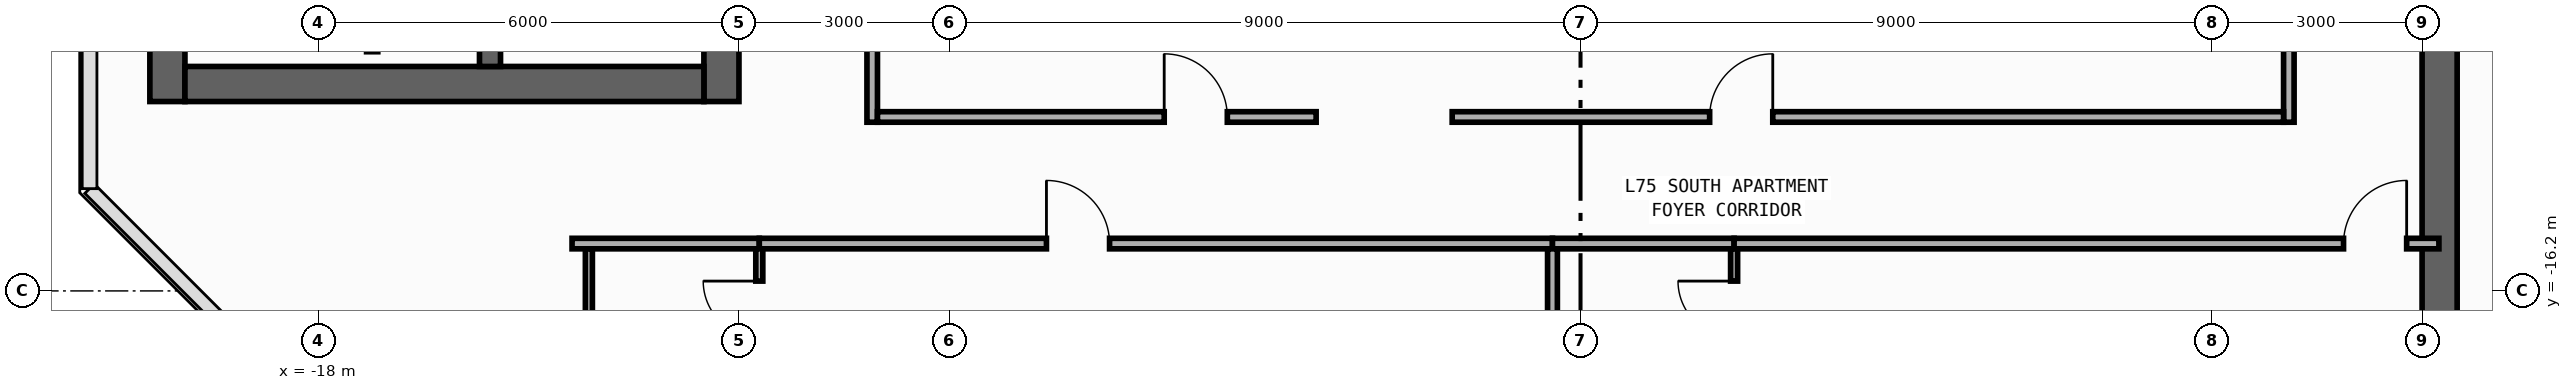
"""IFC4 building model, lengths in metres.
Left out: names, types, materials, properties, quantities, classifications, styles, units other than length and angle.
Written with IfcOpenShell. Run it as: python <this file> out.ifc"""

import sys

from ifc_helpers import new_model, si_unit, direction, frame, frame_2d, origin, place, context, subcontext, project, spatial, rectangle, extrude, element, fill, save


model = new_model("IFC4")
c1 = context("Model", 3, precision=1e-05, world=origin(), true_north=direction((0.0, 1.0)))
c2 = subcontext(c1, "Body", "Model", "MODEL_VIEW")
j1 = project(units=[si_unit("LENGTHUNIT", "METRE"), si_unit("PLANEANGLEUNIT", "RADIAN")], contexts=[c1])
p1 = place(None, origin())
s1 = spatial("IfcSite", under=j1, at=p1, CompositionType="ELEMENT")
p2 = place(p1, origin())
s2 = spatial("IfcBuilding", under=s1, at=p2, CompositionType="ELEMENT")
p3 = place(p2, frame((0.0, 0.0, 311.8)))
s3 = spatial("IfcBuildingStorey", under=s2, at=p3, CompositionType="ELEMENT", Elevation=311.8)
p4 = place(p3, frame((-20.15, -13.5, 0.0), z_axis=(0.0, 0.0, 1.0), x_axis=(0.0, 1.0, 0.0)))
e1 = element("IfcWall", 1, at=p4, inside=s3, PredefinedType="SHEAR", context=c2, shape_type="SweptSolid", body=[
    extrude(rectangle(XDim=27.0, YDim=0.5, at=frame_2d((13.5, 0.0))), origin(), (0.0, 0.0, 1.0), 3.54),
])
p5 = place(p3, frame((-12.25, -13.5, 0.0), z_axis=(0.0, 0.0, 1.0), x_axis=(0.0, 1.0, 0.0)))
e2 = element("IfcWall", 2, at=p5, inside=s3, PredefinedType="SHEAR", context=c2, shape_type="SweptSolid", body=[
    extrude(rectangle(XDim=27.0, YDim=0.5, at=frame_2d((13.5, 0.0))), origin(), (0.0, 0.0, 1.0), 3.54),
])
p6 = place(p5, frame((15.175, 0.0, 0.0)))
e3 = element("IfcOpeningElement", 3, at=p6, cuts=e2, PredefinedType="OPENING", context=c2, shape_type="SweptSolid", body=[
    extrude(rectangle(XDim=0.85, YDim=2.1, at=frame_2d((0.425, 1.05))), frame((0.0, 0.26, 0.0), z_axis=(0.0, -1.0, 0.0), x_axis=(1.0, 0.0, 0.0)), (0.0, 0.0, 1.0), 0.52),
])
p7 = place(p5, frame((21.275, 0.0, 0.0)))
e4 = element("IfcOpeningElement", 4, at=p7, cuts=e2, PredefinedType="OPENING", context=c2, shape_type="SweptSolid", body=[
    extrude(rectangle(XDim=0.85, YDim=2.1, at=frame_2d((0.425, 1.05))), frame((0.0, 0.26, 0.0), z_axis=(0.0, -1.0, 0.0), x_axis=(1.0, 0.0, 0.0)), (0.0, 0.0, 1.0), 0.52),
])
p8 = place(p5, frame((4.275, 0.0, 0.0)))
e5 = element("IfcOpeningElement", 5, at=p8, cuts=e2, PredefinedType="OPENING", context=c2, shape_type="SweptSolid", body=[
    extrude(rectangle(XDim=0.85, YDim=2.1, at=frame_2d((0.425, 1.05))), frame((0.0, 0.26, 0.0), z_axis=(0.0, -1.0, 0.0), x_axis=(1.0, 0.0, 0.0)), (0.0, 0.0, 1.0), 0.52),
])
p9 = place(p5, frame((10.275, 0.0, 0.0)))
e6 = element("IfcOpeningElement", 6, at=p9, cuts=e2, PredefinedType="OPENING", context=c2, shape_type="SweptSolid", body=[
    extrude(rectangle(XDim=0.85, YDim=2.1, at=frame_2d((0.425, 1.05))), frame((0.0, 0.26, 0.0), z_axis=(0.0, -1.0, 0.0), x_axis=(1.0, 0.0, 0.0)), (0.0, 0.0, 1.0), 0.52),
])
p10 = place(p5, frame((12.725, 0.0, 0.0)))
e7 = element("IfcOpeningElement", 7, at=p10, cuts=e2, PredefinedType="OPENING", context=c2, shape_type="SweptSolid", body=[
    extrude(rectangle(XDim=1.15, YDim=2.2, at=frame_2d((0.575, 1.1))), frame((0.0, 0.26, 0.0), z_axis=(0.0, -1.0, 0.0), x_axis=(1.0, 0.0, 0.0)), (0.0, 0.0, 1.0), 0.52),
])
p11 = place(p5, frame((1.625, 0.0, 0.0)))
e8 = element("IfcOpeningElement", 8, at=p11, cuts=e2, PredefinedType="OPENING", context=c2, shape_type="SweptSolid", body=[
    extrude(rectangle(XDim=0.85, YDim=2.1, at=frame_2d((0.425, 1.05))), frame((0.0, 0.26, 0.0), z_axis=(0.0, -1.0, 0.0), x_axis=(1.0, 0.0, 0.0)), (0.0, 0.0, 1.0), 0.52),
])
p12 = place(p3, frame((-19.9, -13.25, 0.0), z_axis=(0.0, 0.0, 1.0), x_axis=(1.0, 0.0, 0.0)))
e9 = element("IfcWall", 9, at=p12, inside=s3, PredefinedType="SHEAR", context=c2, shape_type="SweptSolid", body=[
    extrude(rectangle(XDim=7.4, YDim=0.5, at=frame_2d((3.7, 0.0))), origin(), (0.0, 0.0, 1.0), 3.54),
])
p13 = place(p3, frame((-15.55, -13.0, 0.0), z_axis=(0.0, 0.0, 1.0), x_axis=(0.0, 1.0, 0.0)))
e10 = element("IfcWall", 10, at=p13, inside=s3, PredefinedType="SHEAR", context=c2, shape_type="SweptSolid", body=[
    extrude(rectangle(XDim=26.0, YDim=0.3, at=frame_2d((13.0, 0.0))), origin(), (0.0, 0.0, 1.0), 3.54),
])
p14 = place(p13, frame((12.225, 0.0, 0.0)))
e11 = element("IfcOpeningElement", 11, at=p14, cuts=e10, PredefinedType="OPENING", context=c2, shape_type="SweptSolid", body=[
    extrude(rectangle(XDim=1.15, YDim=2.2, at=frame_2d((0.575, 1.1))), frame((0.0, 0.16, 0.0), z_axis=(0.0, -1.0, 0.0), x_axis=(1.0, 0.0, 0.0)), (0.0, 0.0, 1.0), 0.32),
])
p15 = place(p13, frame((1.125, 0.0, 0.0)))
e12 = element("IfcOpeningElement", 12, at=p15, cuts=e10, PredefinedType="OPENING", context=c2, shape_type="SweptSolid", body=[
    extrude(rectangle(XDim=0.85, YDim=2.1, at=frame_2d((0.425, 1.05))), frame((0.0, 0.16, 0.0), z_axis=(0.0, -1.0, 0.0), x_axis=(1.0, 0.0, 0.0)), (0.0, 0.0, 1.0), 0.32),
])
p16 = place(p3, frame((12.25, -19.8, 0.0), z_axis=(0.0, 0.0, 1.0), x_axis=(0.0, 1.0, 0.0)))
e13 = element("IfcWall", 13, at=p16, inside=s3, PredefinedType="SHEAR", context=c2, shape_type="SweptSolid", body=[
    extrude(rectangle(XDim=27.0, YDim=0.5, at=frame_2d((13.5, 0.0))), origin(), (0.0, 0.0, 1.0), 3.54),
])
p17 = place(p16, frame((23.05, 0.0, 0.0)))
e14 = element("IfcOpeningElement", 14, at=p17, cuts=e13, PredefinedType="OPENING", context=c2, shape_type="SweptSolid", body=[
    extrude(rectangle(XDim=1.1, YDim=2.2, at=frame_2d((0.55, 1.1))), frame((0.0, 0.26, 0.0), z_axis=(0.0, -1.0, 0.0), x_axis=(1.0, 0.0, 0.0)), (0.0, 0.0, 1.0), 0.52),
])
p18 = place(p16, frame((19.85, 0.0, 0.0)))
e15 = element("IfcOpeningElement", 15, at=p18, cuts=e13, PredefinedType="OPENING", context=c2, shape_type="SweptSolid", body=[
    extrude(rectangle(XDim=1.1, YDim=2.2, at=frame_2d((0.55, 1.1))), frame((0.0, 0.26, 0.0), z_axis=(0.0, -1.0, 0.0), x_axis=(1.0, 0.0, 0.0)), (0.0, 0.0, 1.0), 0.52),
])
p19 = place(p16, frame((16.65, 0.0, 0.0)))
e16 = element("IfcOpeningElement", 16, at=p19, cuts=e13, PredefinedType="OPENING", context=c2, shape_type="SweptSolid", body=[
    extrude(rectangle(XDim=1.1, YDim=2.2, at=frame_2d((0.55, 1.1))), frame((0.0, 0.26, 0.0), z_axis=(0.0, -1.0, 0.0), x_axis=(1.0, 0.0, 0.0)), (0.0, 0.0, 1.0), 0.52),
])
p20 = place(p16, frame((10.175, 0.0, 0.0)))
e17 = element("IfcOpeningElement", 17, at=p20, cuts=e13, PredefinedType="OPENING", context=c2, shape_type="SweptSolid", body=[
    extrude(rectangle(XDim=0.85, YDim=2.1, at=frame_2d((0.425, 1.05))), frame((0.0, 0.26, 0.0), z_axis=(0.0, -1.0, 0.0), x_axis=(1.0, 0.0, 0.0)), (0.0, 0.0, 1.0), 0.52),
])
p21 = place(p16, frame((12.725, 0.0, 0.0)))
e18 = element("IfcOpeningElement", 18, at=p21, cuts=e13, PredefinedType="OPENING", context=c2, shape_type="SweptSolid", body=[
    extrude(rectangle(XDim=1.15, YDim=2.2, at=frame_2d((0.575, 1.1))), frame((0.0, 0.26, 0.0), z_axis=(0.0, -1.0, 0.0), x_axis=(1.0, 0.0, 0.0)), (0.0, 0.0, 1.0), 0.52),
])
p22 = place(p16, frame((25.125, 0.0, 0.0)))
e19 = element("IfcOpeningElement", 19, at=p22, cuts=e13, PredefinedType="OPENING", context=c2, shape_type="SweptSolid", body=[
    extrude(rectangle(XDim=0.85, YDim=2.1, at=frame_2d((0.425, 1.05))), frame((0.0, 0.26, 0.0), z_axis=(0.0, -1.0, 0.0), x_axis=(1.0, 0.0, 0.0)), (0.0, 0.0, 1.0), 0.52),
])
p23 = place(p3, frame((-10.1, -13.795, 0.0), z_axis=(0.0, 0.0, 1.0), x_axis=(0.0, 1.0, 0.0)))
e20 = element("IfcWall", 20, at=p23, inside=s3, PredefinedType="PARTITIONING", context=c2, shape_type="SweptSolid", body=[
    extrude(rectangle(XDim=10.205, YDim=0.15, at=frame_2d((5.103, 0.0))), origin(), (0.0, 0.0, 1.0), 3.54),
])
p24 = place(p23, frame((8.027, 0.0, 0.0)))
e21 = element("IfcOpeningElement", 21, at=p24, cuts=e20, PredefinedType="OPENING", context=c2, shape_type="SweptSolid", body=[
    extrude(rectangle(XDim=0.9, YDim=2.15, at=frame_2d((0.45, 1.075))), frame((0.0, 0.085, 0.0), z_axis=(0.0, -1.0, 0.0), x_axis=(1.0, 0.0, 0.0)), (0.0, 0.0, 1.0), 0.17),
])
p25 = place(p3, frame((10.1, -13.795, 0.0), z_axis=(0.0, 0.0, 1.0), x_axis=(0.0, 1.0, 0.0)))
e22 = element("IfcWall", 22, at=p25, inside=s3, PredefinedType="PARTITIONING", context=c2, shape_type="SweptSolid", body=[
    extrude(rectangle(XDim=7.575, YDim=0.15, at=frame_2d((3.788, 0.0))), origin(), (0.0, 0.0, 1.0), 3.54),
])
p26 = place(p25, frame((6.215, 0.0, 0.0)))
e23 = element("IfcOpeningElement", 23, at=p26, cuts=e22, PredefinedType="OPENING", context=c2, shape_type="SweptSolid", body=[
    extrude(rectangle(XDim=0.9, YDim=2.15, at=frame_2d((0.45, 1.075))), frame((0.0, 0.085, 0.0), z_axis=(0.0, -1.0, 0.0), x_axis=(1.0, 0.0, 0.0)), (0.0, 0.0, 1.0), 0.17),
])
p27 = place(p3, frame((-14.38, -15.525, 0.0), z_axis=(0.0, 0.0, 1.0), x_axis=(1.0, 0.0, 0.0)))
e24 = element("IfcWall", 24, at=p27, inside=s3, PredefinedType="PARTITIONING", context=c2, shape_type="SweptSolid", body=[
    extrude(rectangle(XDim=2.67, YDim=0.15, at=frame_2d((1.335, 0.0))), origin(), (0.0, 0.0, 1.0), 3.54),
])
p28 = place(p3, frame((-11.71, -15.525, 0.0), z_axis=(0.0, 0.0, 1.0), x_axis=(1.0, 0.0, 0.0)))
e25 = element("IfcWall", 25, at=p28, inside=s3, PredefinedType="PARTITIONING", context=c2, shape_type="SweptSolid", body=[
    extrude(rectangle(XDim=11.31, YDim=0.15, at=frame_2d((5.655, 0.0))), origin(), (0.0, 0.0, 1.0), 3.54),
])
p29 = place(p28, frame((4.094, 0.0, 0.0)))
e26 = element("IfcOpeningElement", 26, at=p29, cuts=e25, PredefinedType="OPENING", context=c2, shape_type="SweptSolid", body=[
    extrude(rectangle(XDim=0.9, YDim=2.15, at=frame_2d((0.45, 1.075))), frame((0.0, 0.085, 0.0), z_axis=(0.0, -1.0, 0.0), x_axis=(1.0, 0.0, 0.0)), (0.0, 0.0, 1.0), 0.17),
])
p30 = place(p3, frame((-0.4, -15.525, 0.0), z_axis=(0.0, 0.0, 1.0), x_axis=(1.0, 0.0, 0.0)))
e27 = element("IfcWall", 27, at=p30, inside=s3, PredefinedType="PARTITIONING", context=c2, shape_type="SweptSolid", body=[
    extrude(rectangle(XDim=2.59, YDim=0.15, at=frame_2d((1.295, 0.0))), origin(), (0.0, 0.0, 1.0), 3.54),
])
p31 = place(p3, frame((2.19, -15.525, 0.0), z_axis=(0.0, 0.0, 1.0), x_axis=(1.0, 0.0, 0.0)))
e28 = element("IfcWall", 28, at=p31, inside=s3, PredefinedType="PARTITIONING", context=c2, shape_type="SweptSolid", body=[
    extrude(rectangle(XDim=10.05, YDim=0.15, at=frame_2d((5.025, 0.0))), origin(), (0.0, 0.0, 1.0), 3.54),
])
p32 = place(p31, frame((8.69, 0.0, 0.0)))
e29 = element("IfcOpeningElement", 29, at=p32, cuts=e28, PredefinedType="OPENING", context=c2, shape_type="SweptSolid", body=[
    extrude(rectangle(XDim=0.9, YDim=2.15, at=frame_2d((0.45, 1.075))), frame((0.0, 0.085, 0.0), z_axis=(0.0, -1.0, 0.0), x_axis=(1.0, 0.0, 0.0)), (0.0, 0.0, 1.0), 0.17),
])
p33 = place(p3, frame((-10.025, -13.72, 0.0), z_axis=(0.0, 0.0, 1.0), x_axis=(1.0, 0.0, 0.0)))
e30 = element("IfcWall", 30, at=p33, inside=s3, PredefinedType="PARTITIONING", context=c2, shape_type="SweptSolid", body=[
    extrude(rectangle(XDim=6.255, YDim=0.15, at=frame_2d((3.127, 0.0))), origin(), (0.0, 0.0, 1.0), 3.54),
])
p34 = place(p33, frame((4.089, 0.0, 0.0)))
e31 = element("IfcOpeningElement", 31, at=p34, cuts=e30, PredefinedType="OPENING", context=c2, shape_type="SweptSolid", body=[
    extrude(rectangle(XDim=0.9, YDim=2.15, at=frame_2d((0.45, 1.075))), frame((0.0, 0.085, 0.0), z_axis=(0.0, -1.0, 0.0), x_axis=(1.0, 0.0, 0.0)), (0.0, 0.0, 1.0), 0.17),
])
p35 = place(p3, frame((-1.83, -13.72, 0.0), z_axis=(0.0, 0.0, 1.0), x_axis=(1.0, 0.0, 0.0)))
e32 = element("IfcWall", 32, at=p35, inside=s3, PredefinedType="PARTITIONING", context=c2, shape_type="SweptSolid", body=[
    extrude(rectangle(XDim=11.855, YDim=0.15, at=frame_2d((5.927, 0.0))), origin(), (0.0, 0.0, 1.0), 3.54),
])
p36 = place(p35, frame((3.671, 0.0, 0.0)))
e33 = element("IfcOpeningElement", 33, at=p36, cuts=e32, PredefinedType="OPENING", context=c2, shape_type="SweptSolid", body=[
    extrude(rectangle(XDim=0.9, YDim=2.15, at=frame_2d((0.45, 1.075))), frame((0.0, 0.085, 0.0), z_axis=(0.0, -1.0, 0.0), x_axis=(1.0, 0.0, 0.0)), (0.0, 0.0, 1.0), 0.17),
])
p37 = place(p3, frame((-11.71, -18.1, 0.0), z_axis=(0.0, 0.0, 1.0), x_axis=(0.0, 1.0, 0.0)))
e34 = element("IfcWall", 34, at=p37, inside=s3, PredefinedType="PARTITIONING", context=c2, shape_type="SweptSolid", body=[
    extrude(rectangle(XDim=2.5, YDim=0.1, at=frame_2d((1.25, 0.0))), origin(), (0.0, 0.0, 1.0), 3.54),
])
p38 = place(p37, frame((1.24, 0.0, 0.0)))
e35 = element("IfcOpeningElement", 35, at=p38, cuts=e34, PredefinedType="OPENING", context=c2, shape_type="SweptSolid", body=[
    extrude(rectangle(XDim=0.8, YDim=2.1, at=frame_2d((0.4, 1.05))), frame((0.0, 0.06, 0.0), z_axis=(0.0, -1.0, 0.0), x_axis=(1.0, 0.0, 0.0)), (0.0, 0.0, 1.0), 0.12),
])
p39 = place(p3, frame((-0.4, -18.1, 0.0), z_axis=(0.0, 0.0, 1.0), x_axis=(0.0, 1.0, 0.0)))
e36 = element("IfcWall", 36, at=p39, inside=s3, PredefinedType="PARTITIONING", context=c2, shape_type="SweptSolid", body=[
    extrude(rectangle(XDim=2.5, YDim=0.14, at=frame_2d((1.25, 0.0))), origin(), (0.0, 0.0, 1.0), 3.54),
])
p40 = place(p3, frame((2.19, -18.1, 0.0), z_axis=(0.0, 0.0, 1.0), x_axis=(0.0, 1.0, 0.0)))
e37 = element("IfcWall", 37, at=p40, inside=s3, PredefinedType="PARTITIONING", context=c2, shape_type="SweptSolid", body=[
    extrude(rectangle(XDim=2.5, YDim=0.1, at=frame_2d((1.25, 0.0))), origin(), (0.0, 0.0, 1.0), 3.54),
])
p41 = place(p40, frame((1.24, 0.0, 0.0)))
e38 = element("IfcOpeningElement", 38, at=p41, cuts=e37, PredefinedType="OPENING", context=c2, shape_type="SweptSolid", body=[
    extrude(rectangle(XDim=0.8, YDim=2.1, at=frame_2d((0.4, 1.05))), frame((0.0, 0.06, 0.0), z_axis=(0.0, -1.0, 0.0), x_axis=(1.0, 0.0, 0.0)), (0.0, 0.0, 1.0), 0.12),
])
p42 = place(p3, frame((-14.14, -18.05, 0.0), z_axis=(0.0, 0.0, 1.0), x_axis=(0.0, 1.0, 0.0)))
e39 = element("IfcWall", 39, at=p42, inside=s3, PredefinedType="PARTITIONING", context=c2, shape_type="SweptSolid", body=[
    extrude(rectangle(XDim=2.45, YDim=0.1, at=frame_2d((1.225, 0.0))), origin(), (0.0, 0.0, 1.0), 2.64),
])
p43 = place(p29, origin())
e40 = element("IfcDoor", 40, at=p43, inside=s3, OperationType="SINGLE_SWING_LEFT", PredefinedType="DOOR", context=c2, shape_type="SweptSolid", body=[
    extrude(rectangle(XDim=0.9, YDim=2.15, at=frame_2d((0.45, 1.075))), frame((0.0, 0.025, 0.0), z_axis=(0.0, -1.0, 0.0), x_axis=(1.0, 0.0, 0.0)), (0.0, 0.0, 1.0), 0.05),
])
fill(e26, e40)
p44 = place(p32, origin())
e41 = element("IfcDoor", 41, at=p44, inside=s3, OperationType="SINGLE_SWING_RIGHT", PredefinedType="DOOR", context=c2, shape_type="SweptSolid", body=[
    extrude(rectangle(XDim=0.9, YDim=2.15, at=frame_2d((0.45, 1.075))), frame((0.0, 0.025, 0.0), z_axis=(0.0, -1.0, 0.0), x_axis=(1.0, 0.0, 0.0)), (0.0, 0.0, 1.0), 0.05),
])
fill(e29, e41)
p45 = place(p34, origin())
e42 = element("IfcDoor", 42, at=p45, inside=s3, OperationType="SINGLE_SWING_LEFT", PredefinedType="DOOR", context=c2, shape_type="SweptSolid", body=[
    extrude(rectangle(XDim=0.9, YDim=2.15, at=frame_2d((0.45, 1.075))), frame((0.0, 0.025, 0.0), z_axis=(0.0, -1.0, 0.0), x_axis=(1.0, 0.0, 0.0)), (0.0, 0.0, 1.0), 0.05),
])
fill(e31, e42)
p46 = place(p36, origin())
e43 = element("IfcDoor", 43, at=p46, inside=s3, OperationType="SINGLE_SWING_RIGHT", PredefinedType="DOOR", context=c2, shape_type="SweptSolid", body=[
    extrude(rectangle(XDim=0.9, YDim=2.15, at=frame_2d((0.45, 1.075))), frame((0.0, 0.025, 0.0), z_axis=(0.0, -1.0, 0.0), x_axis=(1.0, 0.0, 0.0)), (0.0, 0.0, 1.0), 0.05),
])
fill(e33, e43)
p47 = place(p38, origin())
e44 = element("IfcDoor", 44, at=p47, inside=s3, OperationType="SINGLE_SWING_RIGHT", PredefinedType="DOOR", context=c2, shape_type="SweptSolid", body=[
    extrude(rectangle(XDim=0.8, YDim=2.1, at=frame_2d((0.4, 1.05))), frame((0.0, 0.025, 0.0), z_axis=(0.0, -1.0, 0.0), x_axis=(1.0, 0.0, 0.0)), (0.0, 0.0, 1.0), 0.05),
])
fill(e35, e44)
p48 = place(p41, origin())
e45 = element("IfcDoor", 45, at=p48, inside=s3, OperationType="SINGLE_SWING_RIGHT", PredefinedType="DOOR", context=c2, shape_type="SweptSolid", body=[
    extrude(rectangle(XDim=0.8, YDim=2.1, at=frame_2d((0.4, 1.05))), frame((0.0, 0.025, 0.0), z_axis=(0.0, -1.0, 0.0), x_axis=(1.0, 0.0, 0.0)), (0.0, 0.0, 1.0), 0.05),
])
fill(e38, e45)
save(model, sys.argv[1])
